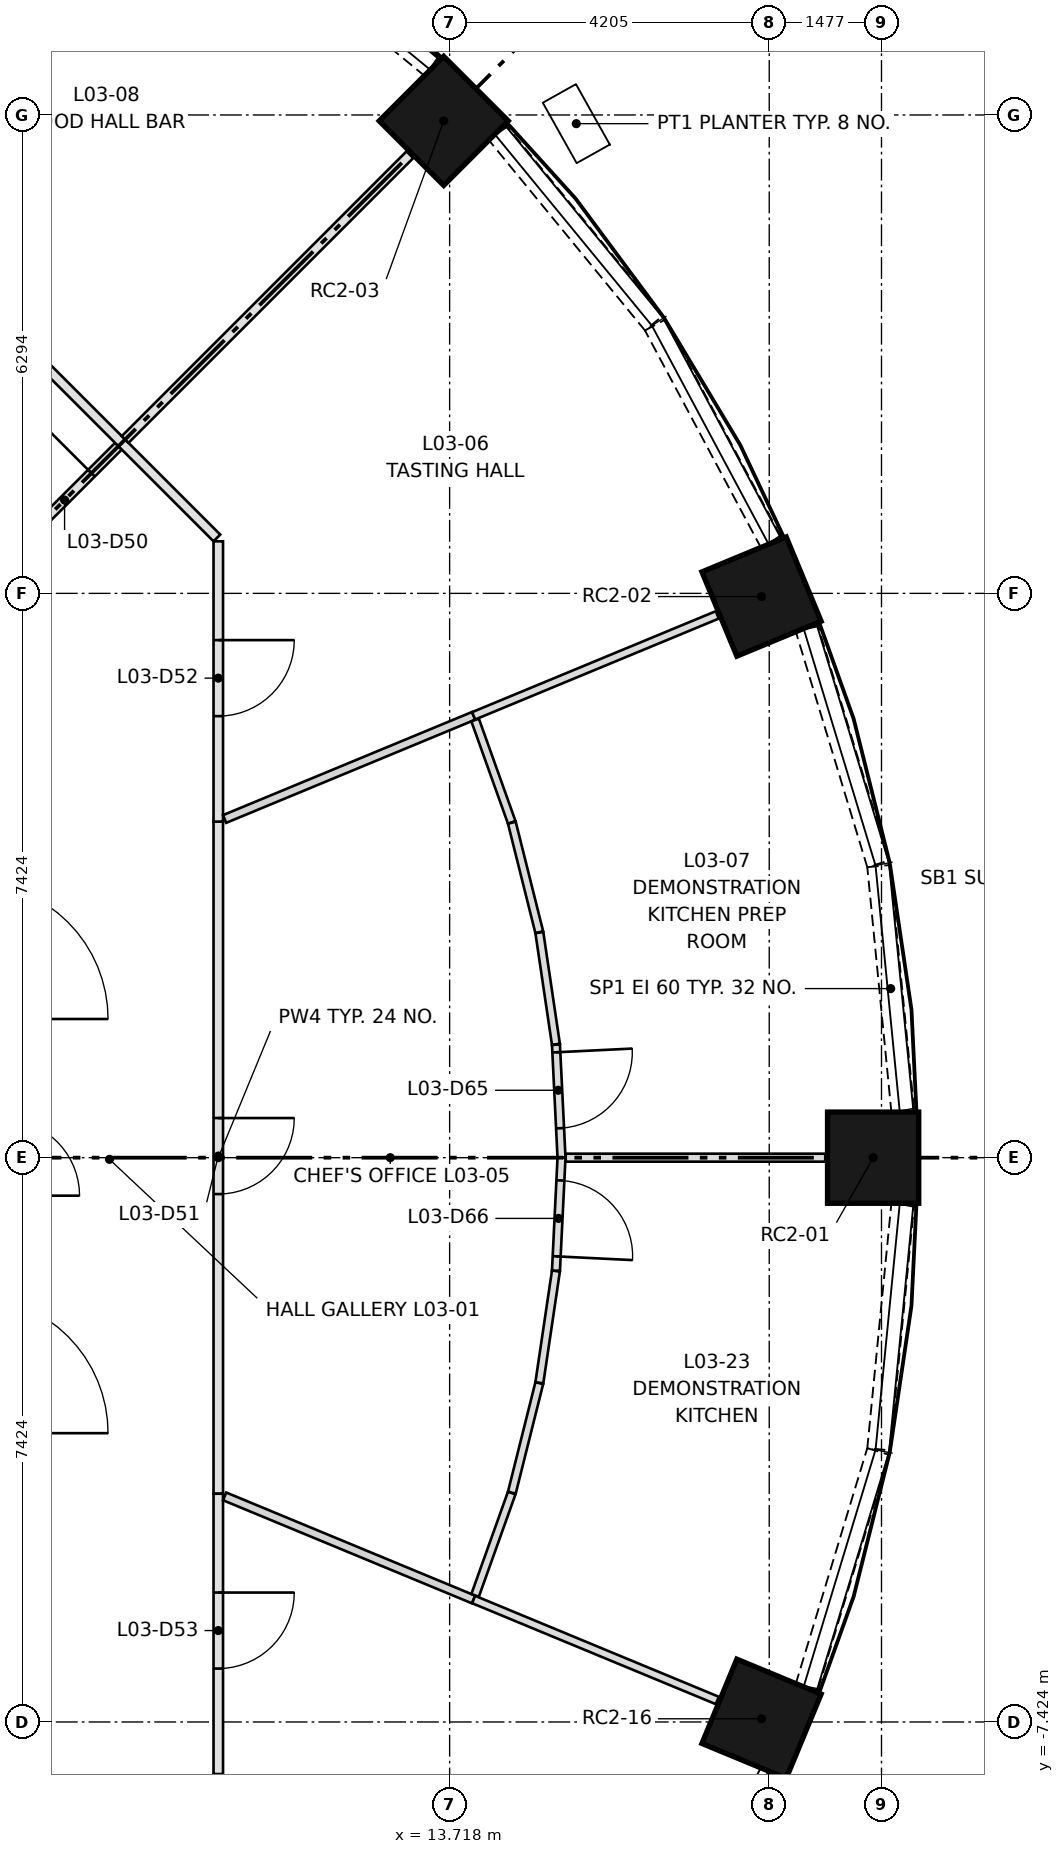
"""IFC4 building model, lengths in metres.
Left out: names, types, materials, properties, quantities, classifications, styles, units other than length and angle.
Written with IfcOpenShell. Run it as: python <this file> out.ifc"""

import sys

from ifc_helpers import new_model, si_unit, direction, frame, frame_2d, origin, origin_2d, place, context, subcontext, project, spatial, rectangle, extrude, element, fill, save


model = new_model("IFC4")
c1 = context("Model", 3, precision=1e-05, world=origin(), true_north=direction((0.0, 1.0)))
c2 = subcontext(c1, "Body", "Model", "MODEL_VIEW")
j1 = project(units=[si_unit("LENGTHUNIT", "METRE"), si_unit("PLANEANGLEUNIT", "RADIAN")], contexts=[c1])
p1 = place(None, origin())
s1 = spatial("IfcSite", under=j1, at=p1, CompositionType="ELEMENT")
p2 = place(p1, origin())
s2 = spatial("IfcBuilding", under=s1, at=p2, CompositionType="ELEMENT")
p3 = place(p2, frame((0.0, 0.0, 14.4)))
s3 = spatial("IfcBuildingStorey", under=s2, at=p3, CompositionType="ELEMENT", Elevation=14.4)
for number, where, z_axis, x_axis in (
    (1, (19.29, 0.0, 0.0), (0.0, 0.0, 1.0), (1.0, 0.0, 0.0)),
    (2, (17.822, 7.382, 0.0), (0.0, 0.0, 1.0), (0.924, 0.383, 0.0)),
    (3, (13.64, 13.64, 0.0), (0.0, 0.0, 1.0), (0.707, 0.707, 0.0)),
    (4, (17.822, -7.382, 0.0), (0.0, 0.0, 1.0), (0.924, -0.383, 0.0)),
):
    element("IfcColumn", number, at=place(p3, frame(where, z_axis=z_axis, x_axis=x_axis)), inside=s3, PredefinedType="COLUMN", context=c2, shape_type="SweptSolid", body=[
        extrude(rectangle(XDim=1.2, YDim=1.2, at=origin_2d()), origin(), (0.0, 0.0, 1.0), 4.1),
    ])
p4 = place(p3, frame((19.679, 0.613, 0.0), z_axis=(0.0, 0.0, 1.0), x_axis=(-0.097839315898, 0.995202224809, 0.0)))
e5 = element("IfcWall", 5, at=p4, inside=s3, PredefinedType="SOLIDWALL", context=c2, shape_type="SweptSolid", body=[
    extrude(rectangle(XDim=3.239, YDim=0.3, at=frame_2d((1.62, 0.0))), origin(), (0.0, 0.0, 1.0), 0.45),
])
p5 = place(p3, frame((19.357, 3.865, 0.0), z_axis=(0.0, 0.0, 1.0), x_axis=(-0.290390365963, 0.956908269039, 0.0)))
e6 = element("IfcWall", 6, at=p5, inside=s3, PredefinedType="SOLIDWALL", context=c2, shape_type="SweptSolid", body=[
    extrude(rectangle(XDim=3.238, YDim=0.3, at=frame_2d((1.619, 0.0))), origin(), (0.0, 0.0, 1.0), 0.45),
])
for number, where, z_axis, x_axis in (
    (7, (17.946, 8.097, 0.0), (0.0, 0.0, 1.0), (-0.471, 0.882, 0.0)),
    (8, (16.404, 10.979, 0.0), (0.0, 0.0, 1.0), (-0.634, 0.773, 0.0)),
    (9, (13.482, 14.35, 0.0), (0.0, 0.0, 1.0), (-0.773, 0.634, 0.0)),
    (10, (16.42, -10.954, 0.0), (0.0, 0.0, 1.0), (0.471, 0.882, 0.0)),
):
    element("IfcWall", number, at=place(p3, frame(where, z_axis=z_axis, x_axis=x_axis)), inside=s3, PredefinedType="SOLIDWALL", context=c2, shape_type="SweptSolid", body=[
        extrude(rectangle(XDim=3.239, YDim=0.3, at=frame_2d((1.619, 0.0))), origin(), (0.0, 0.0, 1.0), 0.45),
    ])
p6 = place(p3, frame((18.417, -6.964, 0.0), z_axis=(0.0, 0.0, 1.0), x_axis=(0.290390365963, 0.956908269039, 0.0)))
e11 = element("IfcWall", 11, at=p6, inside=s3, PredefinedType="SOLIDWALL", context=c2, shape_type="SweptSolid", body=[
    extrude(rectangle(XDim=3.238, YDim=0.3, at=frame_2d((1.619, 0.0))), origin(), (0.0, 0.0, 1.0), 0.45),
])
p7 = place(p3, frame((19.363, -3.836, 0.0), z_axis=(0.0, 0.0, 1.0), x_axis=(0.097839315898, 0.995202224809, 0.0)))
e12 = element("IfcWall", 12, at=p7, inside=s3, PredefinedType="SOLIDWALL", context=c2, shape_type="SweptSolid", body=[
    extrude(rectangle(XDim=3.239, YDim=0.3, at=frame_2d((1.62, 0.0))), origin(), (0.0, 0.0, 1.0), 0.45),
])
p8 = place(p3, frame((7.874, 7.874, 0.0), z_axis=(0.0, 0.0, 1.0), x_axis=(0.707106781187, 0.707106781187, 0.0)))
e13 = element("IfcWall", 13, at=p8, inside=s3, PredefinedType="PARTITIONING", context=c2, shape_type="SweptSolid", body=[
    extrude(rectangle(XDim=2.102, YDim=0.125, at=frame_2d((1.051, 0.0))), origin(), (0.0, 0.0, 1.0), 3.7),
])
p9 = place(p8, frame((0.6, 0.0, 0.0)))
e14 = element("IfcOpeningElement", 14, at=p9, cuts=e13, PredefinedType="OPENING", context=c2, shape_type="SweptSolid", body=[
    extrude(rectangle(XDim=1.0, YDim=2.1, at=frame_2d((0.5, 1.05))), frame((0.0, 0.073, 0.0), z_axis=(0.0, -1.0, 0.0), x_axis=(1.0, 0.0, 0.0)), (0.0, 0.0, 1.0), 0.145),
])
p10 = place(p3, frame((10.674, 4.421, 0.0), z_axis=(0.0, 0.0, 1.0), x_axis=(0.0, -1.0, 0.0)))
e15 = element("IfcWall", 15, at=p10, inside=s3, PredefinedType="PARTITIONING", context=c2, shape_type="SweptSolid", body=[
    extrude(rectangle(XDim=8.843, YDim=0.125, at=frame_2d((4.421, 0.0))), origin(), (0.0, 0.0, 1.0), 3.7),
])
p11 = place(p10, frame((3.9, 0.0, 0.0)))
e16 = element("IfcOpeningElement", 16, at=p11, cuts=e15, PredefinedType="OPENING", context=c2, shape_type="SweptSolid", body=[
    extrude(rectangle(XDim=1.0, YDim=2.1, at=frame_2d((0.5, 1.05))), frame((0.0, 0.073, 0.0), z_axis=(0.0, -1.0, 0.0), x_axis=(1.0, 0.0, 0.0)), (0.0, 0.0, 1.0), 0.145),
])
p12 = place(p3, frame((9.405, 9.405, 0.0), z_axis=(0.0, 0.0, 1.0), x_axis=(0.707106781187, -0.707106781187, 0.0)))
e17 = element("IfcWall", 17, at=p12, inside=s3, PredefinedType="PARTITIONING", context=c2, shape_type="SweptSolid", body=[
    extrude(rectangle(XDim=1.77, YDim=0.125, at=frame_2d((0.885, 0.0))), origin(), (0.0, 0.0, 1.0), 3.7),
])
p13 = place(p3, frame((10.674, 8.109, 0.0), z_axis=(0.0, 0.0, 1.0), x_axis=(0.0, -1.0, 0.0)))
e18 = element("IfcWall", 18, at=p13, inside=s3, PredefinedType="PARTITIONING", context=c2, shape_type="SweptSolid", body=[
    extrude(rectangle(XDim=3.688, YDim=0.125, at=frame_2d((1.844, 0.0))), origin(), (0.0, 0.0, 1.0), 3.7),
])
p14 = place(p13, frame((1.3, 0.0, 0.0)))
e19 = element("IfcOpeningElement", 19, at=p14, cuts=e18, PredefinedType="OPENING", context=c2, shape_type="SweptSolid", body=[
    extrude(rectangle(XDim=1.0, YDim=2.1, at=frame_2d((0.5, 1.05))), frame((0.0, 0.073, 0.0), z_axis=(0.0, -1.0, 0.0), x_axis=(1.0, 0.0, 0.0)), (0.0, 0.0, 1.0), 0.145),
])
p15 = place(p3, frame((10.674, -4.421, 0.0), z_axis=(0.0, 0.0, 1.0), x_axis=(0.0, -1.0, 0.0)))
e20 = element("IfcWall", 20, at=p15, inside=s3, PredefinedType="PARTITIONING", context=c2, shape_type="SweptSolid", body=[
    extrude(rectangle(XDim=3.688, YDim=0.125, at=frame_2d((1.844, 0.0))), origin(), (0.0, 0.0, 1.0), 3.7),
])
p16 = place(p15, frame((1.3, 0.0, 0.0)))
e21 = element("IfcOpeningElement", 21, at=p16, cuts=e20, PredefinedType="OPENING", context=c2, shape_type="SweptSolid", body=[
    extrude(rectangle(XDim=1.0, YDim=2.1, at=frame_2d((0.5, 1.05))), frame((0.0, 0.073, 0.0), z_axis=(0.0, -1.0, 0.0), x_axis=(1.0, 0.0, 0.0)), (0.0, 0.0, 1.0), 0.145),
])
p17 = place(p3, frame((8.153, 10.656, 0.0), z_axis=(0.0, 0.0, 1.0), x_axis=(0.707106781187, -0.707106781187, 0.0)))
e22 = element("IfcWall", 22, at=p17, inside=s3, PredefinedType="PARTITIONING", context=c2, shape_type="SweptSolid", body=[
    extrude(rectangle(XDim=1.77, YDim=0.125, at=frame_2d((0.885, 0.0))), origin(), (0.0, 0.0, 1.0), 3.7),
])
p18 = place(p3, frame((10.758, 4.456, 0.0), z_axis=(0.0, 0.0, 1.0), x_axis=(0.923863266707, 0.38272269913, 0.0)))
e23 = element("IfcWall", 23, at=p18, inside=s3, PredefinedType="PARTITIONING", context=c2, shape_type="SweptSolid", body=[
    extrude(rectangle(XDim=3.546, YDim=0.11, at=frame_2d((1.773, 0.0))), origin(), (0.0, 0.0, 1.0), 3.7),
])
p19 = place(p3, frame((14.053, 5.759, 0.0), z_axis=(0.0, 0.0, 1.0), x_axis=(0.336941851805, -0.941525458234, 0.0)))
e24 = element("IfcWall", 24, at=p19, inside=s3, PredefinedType="PARTITIONING", context=c2, shape_type="SweptSolid", body=[
    extrude(rectangle(XDim=1.43, YDim=0.105, at=frame_2d((0.715, 0.0))), origin(), (0.0, 0.0, 1.0), 3.7),
])
for number, where, z_axis, x_axis in (
    (25, (14.537, 4.407, 0.0), (0.0, 0.0, 1.0), (0.243, -0.97, 0.0)),
    (26, (14.898, 2.961, 0.0), (0.0, 0.0, 1.0), (0.147, -0.989, 0.0)),
):
    element("IfcWall", number, at=place(p3, frame(where, z_axis=z_axis, x_axis=x_axis)), inside=s3, PredefinedType="PARTITIONING", context=c2, shape_type="SweptSolid", body=[
        extrude(rectangle(XDim=1.486, YDim=0.105, at=frame_2d((0.743, 0.0))), origin(), (0.0, 0.0, 1.0), 3.7),
    ])
p20 = place(p3, frame((15.117, 1.486, 0.0), z_axis=(0.0, 0.0, 1.0), x_axis=(0.049053883697, -0.9987961336, 0.0)))
e27 = element("IfcWall", 27, at=p20, inside=s3, PredefinedType="PARTITIONING", context=c2, shape_type="SweptSolid", body=[
    extrude(rectangle(XDim=1.488, YDim=0.105, at=frame_2d((0.744, 0.0))), origin(), (0.0, 0.0, 1.0), 3.7),
])
p21 = place(p20, frame((0.1, 0.0, 0.0)))
e28 = element("IfcOpeningElement", 28, at=p21, cuts=e27, PredefinedType="OPENING", context=c2, shape_type="SweptSolid", body=[
    extrude(rectangle(XDim=1.0, YDim=2.1, at=frame_2d((0.5, 1.05))), frame((0.0, 0.062, 0.0), z_axis=(0.0, -1.0, 0.0), x_axis=(1.0, 0.0, 0.0)), (0.0, 0.0, 1.0), 0.125),
])
p22 = place(p3, frame((14.034, -5.813, 0.0), z_axis=(0.0, 0.0, 1.0), x_axis=(-0.923863266707, 0.38272269913, 0.0)))
e29 = element("IfcWall", 29, at=p22, inside=s3, PredefinedType="PARTITIONING", context=c2, shape_type="SweptSolid", body=[
    extrude(rectangle(XDim=3.546, YDim=0.11, at=frame_2d((1.773, 0.0))), origin(), (0.0, 0.0, 1.0), 3.7),
])
p23 = place(p3, frame((14.535, -4.412, 0.0), z_axis=(0.0, 0.0, 1.0), x_axis=(-0.336941851805, -0.941525458234, 0.0)))
e30 = element("IfcWall", 30, at=p23, inside=s3, PredefinedType="PARTITIONING", context=c2, shape_type="SweptSolid", body=[
    extrude(rectangle(XDim=1.43, YDim=0.105, at=frame_2d((0.715, 0.0))), origin(), (0.0, 0.0, 1.0), 3.7),
])
for number, where, z_axis, x_axis in (
    (31, (14.897, -2.966, 0.0), (0.0, 0.0, 1.0), (-0.243, -0.97, 0.0)),
    (32, (15.116, -1.491, 0.0), (0.0, 0.0, 1.0), (-0.147, -0.989, 0.0)),
):
    element("IfcWall", number, at=place(p3, frame(where, z_axis=z_axis, x_axis=x_axis)), inside=s3, PredefinedType="PARTITIONING", context=c2, shape_type="SweptSolid", body=[
        extrude(rectangle(XDim=1.486, YDim=0.105, at=frame_2d((0.743, 0.0))), origin(), (0.0, 0.0, 1.0), 3.7),
    ])
p24 = place(p3, frame((15.19, 0.0, 0.0), z_axis=(0.0, 0.0, 1.0), x_axis=(-0.049053883697, -0.9987961336, 0.0)))
e33 = element("IfcWall", 33, at=p24, inside=s3, PredefinedType="PARTITIONING", context=c2, shape_type="SweptSolid", body=[
    extrude(rectangle(XDim=1.488, YDim=0.105, at=frame_2d((0.744, 0.0))), origin(), (0.0, 0.0, 1.0), 3.7),
])
p25 = place(p24, frame((0.3, 0.0, 0.0)))
e34 = element("IfcOpeningElement", 34, at=p25, cuts=e33, PredefinedType="OPENING", context=c2, shape_type="SweptSolid", body=[
    extrude(rectangle(XDim=1.0, YDim=2.1, at=frame_2d((0.5, 1.05))), frame((0.0, 0.062, 0.0), z_axis=(0.0, -1.0, 0.0), x_axis=(1.0, 0.0, 0.0)), (0.0, 0.0, 1.0), 0.125),
])
p26 = place(p3, frame((17.24, 7.141, 0.0), z_axis=(0.0, 0.0, 1.0), x_axis=(-0.923880484932, -0.382681133009, 0.0)))
e35 = element("IfcWall", 35, at=p26, inside=s3, PredefinedType="PARTITIONING", context=c2, shape_type="SweptSolid", body=[
    extrude(rectangle(XDim=3.47, YDim=0.105, at=frame_2d((1.735, 0.0))), origin(), (0.0, 0.0, 1.0), 3.7),
])
p27 = place(p3, frame((9.449, 9.449, 0.0), z_axis=(0.0, 0.0, 1.0), x_axis=(0.707106781187, 0.707106781187, 0.0)))
e36 = element("IfcWall", 36, at=p27, inside=s3, PredefinedType="PARTITIONING", context=c2, shape_type="SweptSolid", body=[
    extrude(rectangle(XDim=5.297, YDim=0.125, at=frame_2d((2.649, 0.0))), origin(), (0.0, 0.0, 1.0), 3.7),
])
p28 = place(p3, frame((18.66, 0.0, 0.0), z_axis=(0.0, 0.0, 1.0), x_axis=(-1.0, 0.0, 0.0)))
e37 = element("IfcWall", 37, at=p28, inside=s3, PredefinedType="PARTITIONING", context=c2, shape_type="SweptSolid", body=[
    extrude(rectangle(XDim=3.415, YDim=0.105, at=frame_2d((1.708, 0.0))), origin(), (0.0, 0.0, 1.0), 3.7),
])
p29 = place(p3, frame((14.034, -5.813, 0.0), z_axis=(0.0, 0.0, 1.0), x_axis=(0.923880484932, -0.382681133009, 0.0)))
e38 = element("IfcWall", 38, at=p29, inside=s3, PredefinedType="PARTITIONING", context=c2, shape_type="SweptSolid", body=[
    extrude(rectangle(XDim=3.47, YDim=0.105, at=frame_2d((1.735, 0.0))), origin(), (0.0, 0.0, 1.0), 3.7),
])
p30 = place(p9, origin())
e39 = element("IfcDoor", 39, at=p30, inside=s3, OperationType="SINGLE_SWING_RIGHT", PredefinedType="DOOR", context=c2, shape_type="SweptSolid", body=[
    extrude(rectangle(XDim=1.0, YDim=2.1, at=frame_2d((0.5, 1.05))), frame((0.0, 0.025, 0.0), z_axis=(0.0, -1.0, 0.0), x_axis=(1.0, 0.0, 0.0)), (0.0, 0.0, 1.0), 0.05),
])
fill(e14, e39)
p31 = place(p11, origin())
e40 = element("IfcDoor", 40, at=p31, inside=s3, OperationType="SINGLE_SWING_LEFT", PredefinedType="DOOR", context=c2, shape_type="SweptSolid", body=[
    extrude(rectangle(XDim=1.0, YDim=2.1, at=frame_2d((0.5, 1.05))), frame((0.0, 0.025, 0.0), z_axis=(0.0, -1.0, 0.0), x_axis=(1.0, 0.0, 0.0)), (0.0, 0.0, 1.0), 0.05),
])
fill(e16, e40)
p32 = place(p14, origin())
e41 = element("IfcDoor", 41, at=p32, inside=s3, OperationType="SINGLE_SWING_LEFT", PredefinedType="DOOR", context=c2, shape_type="SweptSolid", body=[
    extrude(rectangle(XDim=1.0, YDim=2.1, at=frame_2d((0.5, 1.05))), frame((0.0, 0.025, 0.0), z_axis=(0.0, -1.0, 0.0), x_axis=(1.0, 0.0, 0.0)), (0.0, 0.0, 1.0), 0.05),
])
fill(e19, e41)
p33 = place(p16, origin())
e42 = element("IfcDoor", 42, at=p33, inside=s3, OperationType="SINGLE_SWING_LEFT", PredefinedType="DOOR", context=c2, shape_type="SweptSolid", body=[
    extrude(rectangle(XDim=1.0, YDim=2.1, at=frame_2d((0.5, 1.05))), frame((0.0, 0.025, 0.0), z_axis=(0.0, -1.0, 0.0), x_axis=(1.0, 0.0, 0.0)), (0.0, 0.0, 1.0), 0.05),
])
fill(e21, e42)
p34 = place(p21, origin())
e43 = element("IfcDoor", 43, at=p34, inside=s3, OperationType="SINGLE_SWING_LEFT", PredefinedType="DOOR", context=c2, shape_type="SweptSolid", body=[
    extrude(rectangle(XDim=1.0, YDim=2.1, at=frame_2d((0.5, 1.05))), frame((0.0, 0.025, 0.0), z_axis=(0.0, -1.0, 0.0), x_axis=(1.0, 0.0, 0.0)), (0.0, 0.0, 1.0), 0.05),
])
fill(e28, e43)
p35 = place(p25, origin())
e44 = element("IfcDoor", 44, at=p35, inside=s3, OperationType="SINGLE_SWING_RIGHT", PredefinedType="DOOR", context=c2, shape_type="SweptSolid", body=[
    extrude(rectangle(XDim=1.0, YDim=2.1, at=frame_2d((0.5, 1.05))), frame((0.0, 0.025, 0.0), z_axis=(0.0, -1.0, 0.0), x_axis=(1.0, 0.0, 0.0)), (0.0, 0.0, 1.0), 0.05),
])
fill(e34, e44)
save(model, sys.argv[1])
